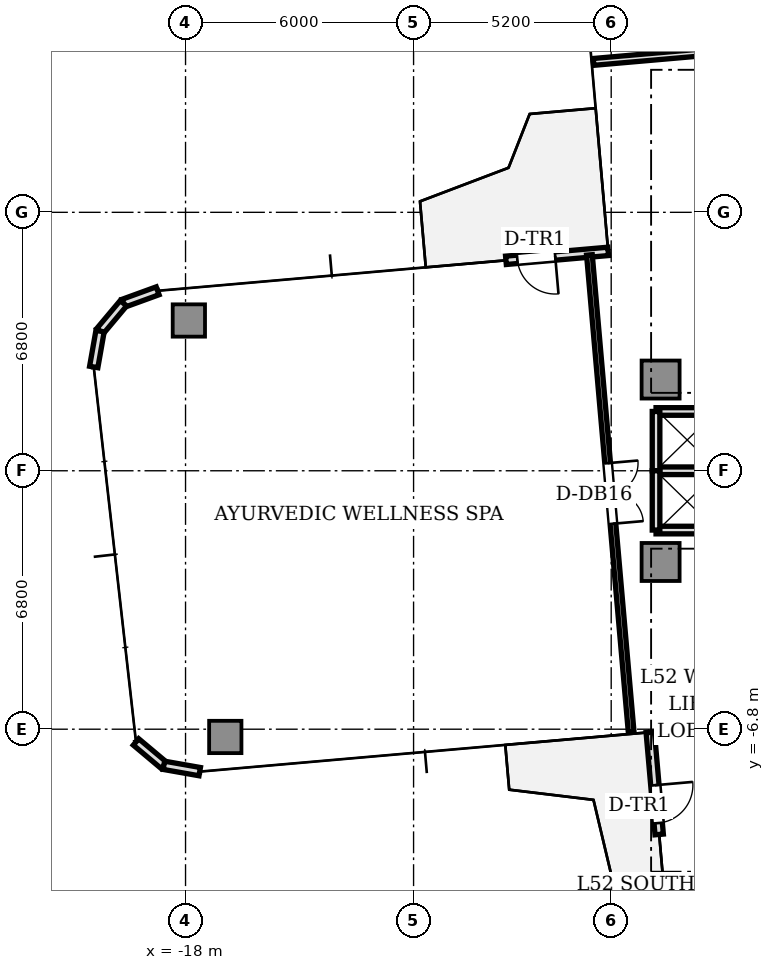
"""IFC4 building model, lengths in metres.
Left out: names, types, materials, properties, quantities, classifications, styles, units other than length and angle.
Written with IfcOpenShell. Run it as: python <this file> out.ifc"""

import sys

from ifc_helpers import new_model, si_unit, direction, frame, frame_2d, origin, origin_2d, place, context, subcontext, project, spatial, rectangle, extrude, source, transform, mapped, element, fill, save


model = new_model("IFC4")
c1 = context("Model", 3, precision=1e-05, world=origin(), true_north=direction((0.0, 1.0)))
c2 = subcontext(c1, "Body", "Model", "MODEL_VIEW")
j1 = project(units=[si_unit("LENGTHUNIT", "METRE"), si_unit("PLANEANGLEUNIT", "RADIAN")], contexts=[c1])
p1 = place(None, origin())
s1 = spatial("IfcSite", under=j1, at=p1, CompositionType="ELEMENT")
p2 = place(p1, origin())
s2 = spatial("IfcBuilding", under=s1, at=p2, CompositionType="ELEMENT")
p3 = place(p2, frame((0.0, 0.0, 188.6)))
s3 = spatial("IfcBuildingStorey", under=s2, at=p3, CompositionType="ELEMENT", Elevation=188.6)
m1 = source(origin(), c2, "Body", "SweptSolid", [
    extrude(rectangle(XDim=1.0, YDim=1.0, at=origin_2d()), origin(), (0.0, 0.0, 1.0), 3.11),
])
for number, where, z_axis, x_axis in (
    (1, (-5.5, 2.4, 0.0), (0.0, 0.0, 1.0), (1.0, 0.0, 0.0)),
    (2, (-5.5, -2.4, 0.0), (0.0, 0.0, 1.0), (1.0, 0.0, 0.0)),
):
    element("IfcColumn", number, at=place(p3, frame(where, z_axis=z_axis, x_axis=x_axis)), inside=s3, PredefinedType="COLUMN", context=c2, shape_type="MappedRepresentation", body=[
        mapped(m1, transform((0.0, 0.0, 0.0), scale=1.0)),
    ])
m2 = source(origin(), c2, "Body", "SweptSolid", [
    extrude(rectangle(XDim=0.85, YDim=0.85, at=origin_2d()), origin(), (0.0, 0.0, 1.0), 3.11),
])
for number, where, z_axis, x_axis in (
    (3, (-17.913, 3.954, 0.0), (0.0, 0.0, 1.0), (1.0, 0.0, 0.0)),
    (4, (-16.954, -7.004, 0.0), (0.0, 0.0, 1.0), (1.0, 0.0, 0.0)),
):
    element("IfcColumn", number, at=place(p3, frame(where, z_axis=z_axis, x_axis=x_axis)), inside=s3, PredefinedType="COLUMN", context=c2, shape_type="MappedRepresentation", body=[
        mapped(m2, transform((0.0, 0.0, 0.0), scale=1.0)),
    ])
p4 = place(p3, frame((-6.879, 5.772, 0.0), z_axis=(0.0, 0.0, 1.0), x_axis=(-0.996193619346, -0.087168071984, 0.0)))
e5 = element("IfcWall", 5, at=p4, inside=s3, PredefinedType="STANDARD", context=c2, shape_type="SweptSolid", body=[
    extrude(rectangle(XDim=2.7, YDim=0.22, at=frame_2d((1.35, 0.0))), origin(), (0.0, 0.0, 1.0), 3.11),
])
p5 = place(p4, frame((1.4, 0.0, 0.0)))
e6 = element("IfcOpeningElement", 6, at=p5, cuts=e5, PredefinedType="OPENING", context=c2, shape_type="SweptSolid", body=[
    extrude(rectangle(XDim=1.0, YDim=2.2, at=frame_2d((0.5, 1.1))), frame((0.0, 0.12, 0.0), z_axis=(0.0, -1.0, 0.0), x_axis=(1.0, 0.0, 0.0)), (0.0, 0.0, 1.0), 0.24),
])
p6 = place(p3, frame((-18.734, 4.735, 0.0), z_axis=(0.0, 0.0, 1.0), x_axis=(-0.939741306239, -0.34188635151, 0.0)))
e7 = element("IfcWall", 7, at=p6, inside=s3, PredefinedType="STANDARD", context=c2, shape_type="SweptSolid", body=[
    extrude(rectangle(XDim=0.958, YDim=0.22, at=frame_2d((0.479, 0.0))), origin(), (0.0, 0.0, 1.0), 3.11),
])
for number, where, z_axis, x_axis in (
    (8, (-19.634, 4.408, 0.0), (0.0, 0.0, 1.0), (-0.643, -0.766, 0.0)),
    (9, (-20.25, 3.674, 0.0), (0.0, 0.0, 1.0), (-0.174, -0.985, 0.0)),
):
    element("IfcWall", number, at=place(p3, frame(where, z_axis=z_axis, x_axis=x_axis)), inside=s3, PredefinedType="STANDARD", context=c2, shape_type="SweptSolid", body=[
        extrude(rectangle(XDim=0.958, YDim=0.22, at=frame_2d((0.479, 0.0))), origin(), (0.0, 0.0, 1.0), 3.11),
    ])
p7 = place(p3, frame((-19.304, -7.135, 0.0), z_axis=(0.0, 0.0, 1.0), x_axis=(0.766001159887, -0.642839189107, 0.0)))
e10 = element("IfcWall", 10, at=p7, inside=s3, PredefinedType="STANDARD", context=c2, shape_type="SweptSolid", body=[
    extrude(rectangle(XDim=0.958, YDim=0.22, at=frame_2d((0.479, 0.0))), origin(), (0.0, 0.0, 1.0), 3.11),
])
p8 = place(p3, frame((-18.57, -7.75, 0.0), z_axis=(0.0, 0.0, 1.0), x_axis=(0.984770724397, -0.173858046606, 0.0)))
e11 = element("IfcWall", 11, at=p8, inside=s3, PredefinedType="STANDARD", context=c2, shape_type="SweptSolid", body=[
    extrude(rectangle(XDim=0.958, YDim=0.22, at=frame_2d((0.479, 0.0))), origin(), (0.0, 0.0, 1.0), 3.11),
])
p9 = place(p3, frame((-5.772, -6.879, 0.0), z_axis=(0.0, 0.0, 1.0), x_axis=(0.087168071984, -0.996193619346, 0.0)))
e12 = element("IfcWall", 12, at=p9, inside=s3, PredefinedType="STANDARD", context=c2, shape_type="SweptSolid", body=[
    extrude(rectangle(XDim=2.7, YDim=0.22, at=frame_2d((1.35, 0.0))), origin(), (0.0, 0.0, 1.0), 3.11),
])
p10 = place(p9, frame((1.4, 0.0, 0.0)))
e13 = element("IfcOpeningElement", 13, at=p10, cuts=e12, PredefinedType="OPENING", context=c2, shape_type="SweptSolid", body=[
    extrude(rectangle(XDim=1.0, YDim=2.2, at=frame_2d((0.5, 1.1))), frame((0.0, 0.12, 0.0), z_axis=(0.0, -1.0, 0.0), x_axis=(1.0, 0.0, 0.0)), (0.0, 0.0, 1.0), 0.24),
])
for number, where, z_axis, x_axis in (
    (14, (-5.62, 1.56, 0.0), (0.0, 0.0, 1.0), (1.0, 0.0, 0.0)),
    (15, (-5.62, -1.56, 0.0), (0.0, 0.0, 1.0), (1.0, 0.0, 0.0)),
    (16, (-5.62, 0.0, 0.0), (0.0, 0.0, 1.0), (1.0, 0.0, 0.0)),
):
    element("IfcWall", number, at=place(p3, frame(where, z_axis=z_axis, x_axis=x_axis)), inside=s3, PredefinedType="SOLIDWALL", context=c2, shape_type="SweptSolid", body=[
        extrude(rectangle(XDim=1.64, YDim=0.2, at=frame_2d((0.82, 0.0))), origin(), (0.0, 0.0, 1.0), 2.66),
    ])
for number, where, z_axis, x_axis in (
    (17, (-5.62, 0.0, 0.0), (0.0, 0.0, 1.0), (0.0, 1.0, 0.0)),
    (18, (-5.62, -1.56, 0.0), (0.0, 0.0, 1.0), (0.0, 1.0, 0.0)),
):
    element("IfcWall", number, at=place(p3, frame(where, z_axis=z_axis, x_axis=x_axis)), inside=s3, PredefinedType="SOLIDWALL", context=c2, shape_type="SweptSolid", body=[
        extrude(rectangle(XDim=1.56, YDim=0.2, at=frame_2d((0.78, 0.0))), origin(), (0.0, 0.0, 1.0), 2.66),
    ])
p11 = place(p3, frame((3.095, 11.664, 0.0), z_axis=(0.0, 0.0, 1.0), x_axis=(-0.996196061386, -0.087140158824, 0.0)))
e19 = element("IfcWall", 19, at=p11, inside=s3, PredefinedType="PARTITIONING", context=c2, shape_type="SweptSolid", body=[
    extrude(rectangle(XDim=10.4, YDim=0.18, at=frame_2d((5.2, 0.0))), origin(), (0.0, 0.0, 1.0), 2.66),
])
p12 = place(p3, frame((-7.373, 5.679, 0.0), z_axis=(0.0, 0.0, 1.0), x_axis=(0.087154691724, -0.996194790044, 0.0)))
e20 = element("IfcWall", 20, at=p12, inside=s3, PredefinedType="PARTITIONING", context=c2, shape_type="SweptSolid", body=[
    extrude(rectangle(XDim=12.6, YDim=0.15, at=frame_2d((6.3, 0.0))), origin(), (0.0, 0.0, 1.0), 2.66),
])
p13 = place(p12, frame((5.5, 0.0, 0.0)))
e21 = element("IfcOpeningElement", 21, at=p13, cuts=e20, PredefinedType="OPENING", context=c2, shape_type="SweptSolid", body=[
    extrude(rectangle(XDim=1.6, YDim=2.25, at=frame_2d((0.8, 1.125))), frame((0.0, 0.085, 0.0), z_axis=(0.0, -1.0, 0.0), x_axis=(1.0, 0.0, 0.0)), (0.0, 0.0, 1.0), 0.17),
])
m3 = source(origin(), c2, "Body", "SweptSolid", [
    extrude(rectangle(XDim=1.0, YDim=0.05, at=origin_2d()), origin(), (0.0, 0.0, 1.0), 2.2),
])
p14 = place(p5, frame((0.5, 0.0, 0.0)))
e22 = element("IfcDoor", 22, at=p14, inside=s3, OperationType="SINGLE_SWING_LEFT", PredefinedType="DOOR", context=c2, shape_type="MappedRepresentation", body=[
    mapped(m3, transform((0.0, 0.0, 0.0), scale=1.0)),
])
fill(e6, e22)
p15 = place(p10, frame((0.5, 0.0, 0.0)))
e23 = element("IfcDoor", 23, at=p15, inside=s3, OperationType="SINGLE_SWING_LEFT", PredefinedType="DOOR", context=c2, shape_type="MappedRepresentation", body=[
    mapped(m3, transform((0.0, 0.0, 0.0), scale=1.0)),
])
fill(e13, e23)
m4 = source(origin(), c2, "Body", "SweptSolid", [
    extrude(rectangle(XDim=1.6, YDim=0.05, at=origin_2d()), origin(), (0.0, 0.0, 1.0), 2.25),
])
p16 = place(p13, frame((0.8, 0.0, 0.0)))
e24 = element("IfcDoor", 24, at=p16, inside=s3, OperationType="DOUBLE_DOOR_SINGLE_SWING", PredefinedType="DOOR", context=c2, shape_type="MappedRepresentation", body=[
    mapped(m4, transform((0.0, 0.0, 0.0), scale=1.0)),
])
fill(e21, e24)
save(model, sys.argv[1])
